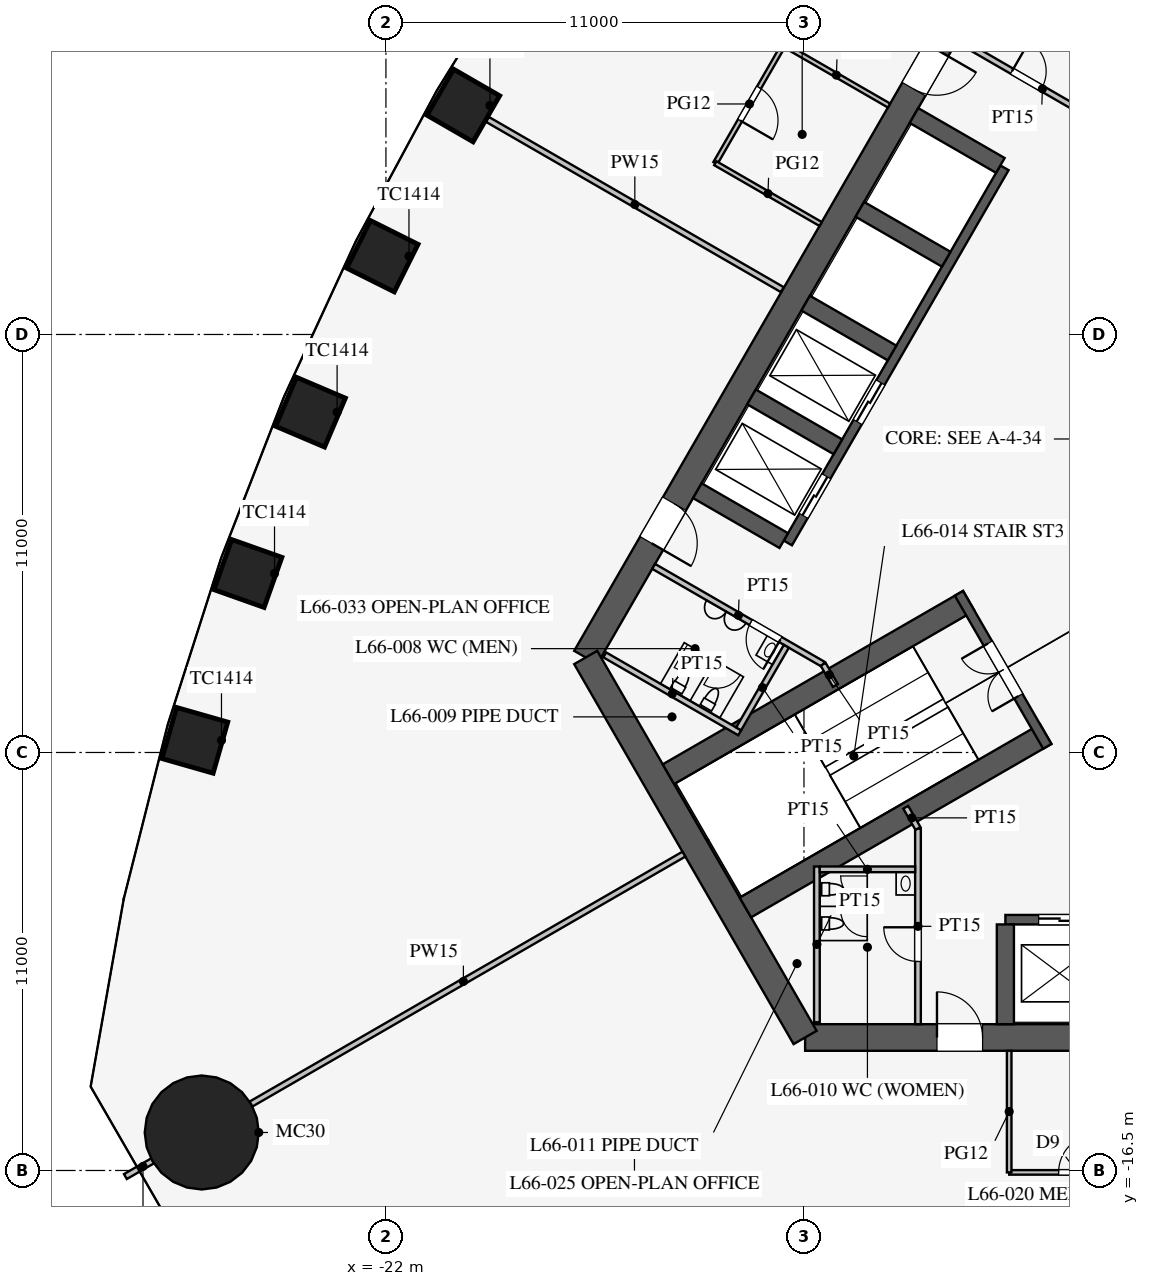
"""IFC4 building model, lengths in metres.
Left out: names, types, materials, properties, quantities, classifications, styles, units other than length and angle.
Written with IfcOpenShell. Run it as: python <this file> out.ifc"""

import sys

from ifc_helpers import new_model, si_unit, direction, frame, frame_2d, origin, origin_2d, place, context, subcontext, project, spatial, rectangle, circle, extrude, element, fill, save


model = new_model("IFC4")
c1 = context("Model", 3, precision=1e-05, world=origin(), true_north=direction((0.0, 1.0)))
c2 = subcontext(c1, "Body", "Model", "MODEL_VIEW")
j1 = project(units=[si_unit("LENGTHUNIT", "METRE"), si_unit("PLANEANGLEUNIT", "RADIAN")], contexts=[c1])
p1 = place(None, origin())
s1 = spatial("IfcSite", under=j1, at=p1, CompositionType="ELEMENT")
p2 = place(p1, origin())
s2 = spatial("IfcBuilding", under=s1, at=p2, CompositionType="ELEMENT")
p3 = place(p2, frame((0.0, 0.0, 288.9)))
s3 = spatial("IfcBuildingStorey", under=s2, at=p3, CompositionType="ELEMENT", Elevation=288.9)
for number, where, z_axis, x_axis in (
    (1, (-19.963, 11.526, 0.0), (0.0, 0.0, 1.0), (-0.5, -0.866, 0.0)),
    (2, (-22.094, 7.56, 0.0), (0.0, 0.0, 1.0), (-0.447, -0.895, 0.0)),
    (3, (-23.985, 3.455, 0.0), (0.0, 0.0, 1.0), (-0.391, -0.92, 0.0)),
    (4, (-25.632, -0.79, 0.0), (0.0, 0.0, 1.0), (-0.334, -0.942, 0.0)),
    (5, (-27.027, -5.18, 0.0), (0.0, 0.0, 1.0), (-0.275, -0.961, 0.0)),
):
    element("IfcColumn", number, at=place(p3, frame(where, z_axis=z_axis, x_axis=x_axis)), inside=s3, PredefinedType="COLUMN", context=c2, shape_type="SweptSolid", body=[
        extrude(rectangle(XDim=1.4, YDim=1.4, at=origin_2d()), origin(), (0.0, 0.0, 1.0), 4.2),
    ])
p4 = place(p3, frame((-26.847, -15.5, 0.0), z_axis=(0.0, 0.0, 1.0), x_axis=(1.0, 0.0, 0.0)))
e6 = element("IfcColumn", 6, at=p4, inside=s3, PredefinedType="COLUMN", context=c2, shape_type="SweptSolid", body=[
    extrude(circle(Radius=1.5, at=origin_2d()), origin(), (0.0, 0.0, 1.0), 4.2),
])
p5 = place(p3, frame((-10.97, -13.0, 0.0), z_axis=(0.0, 0.0, 1.0), x_axis=(1.0, 0.0, 0.0)))
e7 = element("IfcWall", 7, at=p5, inside=s3, PredefinedType="SHEAR", context=c2, shape_type="SweptSolid", body=[
    extrude(rectangle(XDim=21.939, YDim=0.7, at=frame_2d((10.97, 0.0))), origin(), (0.0, 0.0, 1.0), 4.2),
])
p6 = place(p5, frame((17.27, 0.0, 0.0)))
e8 = element("IfcOpeningElement", 8, at=p6, cuts=e7, PredefinedType="OPENING", context=c2, shape_type="SweptSolid", body=[
    extrude(rectangle(XDim=1.2, YDim=2.1, at=frame_2d((0.6, 1.05))), frame((0.0, 0.36, 0.0), z_axis=(0.0, -1.0, 0.0), x_axis=(1.0, 0.0, 0.0)), (0.0, 0.0, 1.0), 0.72),
])
p7 = place(p5, frame((3.47, 0.0, 0.0)))
e9 = element("IfcOpeningElement", 9, at=p7, cuts=e7, PredefinedType="OPENING", context=c2, shape_type="SweptSolid", body=[
    extrude(rectangle(XDim=1.2, YDim=2.1, at=frame_2d((0.6, 1.05))), frame((0.0, 0.36, 0.0), z_axis=(0.0, -1.0, 0.0), x_axis=(1.0, 0.0, 0.0)), (0.0, 0.0, 1.0), 0.72),
])
p8 = place(p3, frame((-5.773, 16.0, 0.0), z_axis=(0.0, 0.0, 1.0), x_axis=(-0.500002442456, -0.866023993627, 0.0)))
e10 = element("IfcWall", 10, at=p8, inside=s3, PredefinedType="SHEAR", context=c2, shape_type="SweptSolid", body=[
    extrude(rectangle(XDim=21.939, YDim=0.7, at=frame_2d((10.97, 0.0))), origin(), (0.0, 0.0, 1.0), 4.2),
])
p9 = place(p8, frame((17.27, 0.0, 0.0)))
e11 = element("IfcOpeningElement", 11, at=p9, cuts=e10, PredefinedType="OPENING", context=c2, shape_type="SweptSolid", body=[
    extrude(rectangle(XDim=1.2, YDim=2.1, at=frame_2d((0.6, 1.05))), frame((0.0, 0.36, 0.0), z_axis=(0.0, -1.0, 0.0), x_axis=(1.0, 0.0, 0.0)), (0.0, 0.0, 1.0), 0.72),
])
p10 = place(p8, frame((3.47, 0.0, 0.0)))
e12 = element("IfcOpeningElement", 12, at=p10, cuts=e10, PredefinedType="OPENING", context=c2, shape_type="SweptSolid", body=[
    extrude(rectangle(XDim=1.2, YDim=2.1, at=frame_2d((0.6, 1.05))), frame((0.0, 0.36, 0.0), z_axis=(0.0, -1.0, 0.0), x_axis=(1.0, 0.0, 0.0)), (0.0, 0.0, 1.0), 0.72),
])
p11 = place(p3, frame((-16.743, -3.0, 0.0), z_axis=(0.0, 0.0, 1.0), x_axis=(0.499995765644, -0.866027848477, 0.0)))
e13 = element("IfcWall", 13, at=p11, inside=s3, PredefinedType="SHEAR", context=c2, shape_type="SweptSolid", body=[
    extrude(rectangle(XDim=11.547, YDim=0.7, at=frame_2d((5.773, 0.0))), origin(), (0.0, 0.0, 1.0), 4.2),
])
p12 = place(p3, frame((-5.7, -9.9, 0.0), z_axis=(0.0, 0.0, 1.0), x_axis=(1.0, 0.0, 0.0)))
e14 = element("IfcWall", 14, at=p12, inside=s3, PredefinedType="SHEAR", context=c2, shape_type="SweptSolid", body=[
    extrude(rectangle(XDim=11.4, YDim=0.25, at=frame_2d((5.7, 0.0))), origin(), (0.0, 0.0, 1.0), 4.2),
])
p13 = place(p12, frame((0.875, 0.0, 0.0)))
e15 = element("IfcOpeningElement", 15, at=p13, cuts=e14, PredefinedType="OPENING", context=c2, shape_type="SweptSolid", body=[
    extrude(rectangle(XDim=1.1, YDim=2.2, at=frame_2d((0.55, 1.1))), frame((0.0, 0.135, 0.0), z_axis=(0.0, -1.0, 0.0), x_axis=(1.0, 0.0, 0.0)), (0.0, 0.0, 1.0), 0.27),
])
p14 = place(p12, frame((3.725, 0.0, 0.0)))
e16 = element("IfcOpeningElement", 16, at=p14, cuts=e14, PredefinedType="OPENING", context=c2, shape_type="SweptSolid", body=[
    extrude(rectangle(XDim=1.1, YDim=2.2, at=frame_2d((0.55, 1.1))), frame((0.0, 0.135, 0.0), z_axis=(0.0, -1.0, 0.0), x_axis=(1.0, 0.0, 0.0)), (0.0, 0.0, 1.0), 0.27),
])
p15 = place(p12, frame((6.575, 0.0, 0.0)))
e17 = element("IfcOpeningElement", 17, at=p15, cuts=e14, PredefinedType="OPENING", context=c2, shape_type="SweptSolid", body=[
    extrude(rectangle(XDim=1.1, YDim=2.2, at=frame_2d((0.55, 1.1))), frame((0.0, 0.135, 0.0), z_axis=(0.0, -1.0, 0.0), x_axis=(1.0, 0.0, 0.0)), (0.0, 0.0, 1.0), 0.27),
])
p16 = place(p12, frame((9.425, 0.0, 0.0)))
e18 = element("IfcOpeningElement", 18, at=p16, cuts=e14, PredefinedType="OPENING", context=c2, shape_type="SweptSolid", body=[
    extrude(rectangle(XDim=1.1, YDim=2.2, at=frame_2d((0.55, 1.1))), frame((0.0, 0.135, 0.0), z_axis=(0.0, -1.0, 0.0), x_axis=(1.0, 0.0, 0.0)), (0.0, 0.0, 1.0), 0.27),
])
p17 = place(p3, frame((-5.7, -10.025, 0.0), z_axis=(0.0, 0.0, 1.0), x_axis=(0.0, -1.0, 0.0)))
e19 = element("IfcWall", 19, at=p17, inside=s3, PredefinedType="SHEAR", context=c2, shape_type="SweptSolid", body=[
    extrude(rectangle(XDim=2.625, YDim=0.45, at=frame_2d((1.312, 0.0))), origin(), (0.0, 0.0, 1.0), 4.2),
])
p18 = place(p3, frame((-5.724, 9.886, 0.0), z_axis=(0.0, 0.0, 1.0), x_axis=(-0.500001763848, -0.866024385424, 0.0)))
e20 = element("IfcWall", 20, at=p18, inside=s3, PredefinedType="SHEAR", context=c2, shape_type="SweptSolid", body=[
    extrude(rectangle(XDim=11.4, YDim=0.25, at=frame_2d((5.7, 0.0))), origin(), (0.0, 0.0, 1.0), 4.2),
])
p19 = place(p18, frame((6.525, 0.0, 0.0)))
e21 = element("IfcOpeningElement", 21, at=p19, cuts=e20, PredefinedType="OPENING", context=c2, shape_type="SweptSolid", body=[
    extrude(rectangle(XDim=1.2, YDim=2.2, at=frame_2d((0.6, 1.1))), frame((0.0, 0.135, 0.0), z_axis=(0.0, -1.0, 0.0), x_axis=(1.0, 0.0, 0.0)), (0.0, 0.0, 1.0), 0.27),
])
p20 = place(p18, frame((9.375, 0.0, 0.0)))
e22 = element("IfcOpeningElement", 22, at=p20, cuts=e20, PredefinedType="OPENING", context=c2, shape_type="SweptSolid", body=[
    extrude(rectangle(XDim=1.2, YDim=2.2, at=frame_2d((0.6, 1.1))), frame((0.0, 0.135, 0.0), z_axis=(0.0, -1.0, 0.0), x_axis=(1.0, 0.0, 0.0)), (0.0, 0.0, 1.0), 0.27),
])
for number, where, z_axis, x_axis in (
    (23, (-5.832, 9.949, 0.0), (0.0, 0.0, 1.0), (-0.866, 0.5, 0.0)),
    (24, (-7.257, 7.481, 0.0), (0.0, 0.0, 1.0), (-0.866, 0.5, 0.0)),
    (25, (-8.682, 5.012, 0.0), (0.0, 0.0, 1.0), (-0.866, 0.5, 0.0)),
    (26, (-10.107, 2.544, 0.0), (0.0, 0.0, 1.0), (-0.866, 0.5, 0.0)),
    (27, (-11.532, 0.076, 0.0), (0.0, 0.0, 1.0), (-0.866, 0.5, 0.0)),
):
    element("IfcWall", number, at=place(p3, frame(where, z_axis=z_axis, x_axis=x_axis)), inside=s3, PredefinedType="SHEAR", context=c2, shape_type="SweptSolid", body=[
        extrude(rectangle(XDim=2.625, YDim=0.45, at=frame_2d((1.312, 0.0))), origin(), (0.0, 0.0, 1.0), 4.2),
    ])
for number, where, z_axis, x_axis in (
    (28, (-6.663, -1.509, 0.0), (0.0, 0.0, 1.0), (-0.866, -0.5, 0.0)),
    (29, (-4.638, -5.016, 0.0), (0.0, 0.0, 1.0), (-0.866, -0.5, 0.0)),
):
    element("IfcWall", number, at=place(p3, frame(where, z_axis=z_axis, x_axis=x_axis)), inside=s3, PredefinedType="SHEAR", context=c2, shape_type="SweptSolid", body=[
        extrude(rectangle(XDim=9.125, YDim=0.6, at=frame_2d((4.562, 0.0))), origin(), (0.0, 0.0, 1.0), 4.2),
    ])
p21 = place(p3, frame((-6.922, -1.312, 0.0), z_axis=(0.0, 0.0, 1.0), x_axis=(0.499984536904, -0.866034331223, 0.0)))
e30 = element("IfcWall", 30, at=p21, inside=s3, PredefinedType="SHEAR", context=c2, shape_type="SweptSolid", body=[
    extrude(rectangle(XDim=4.65, YDim=0.25, at=frame_2d((2.325, 0.0))), origin(), (0.0, 0.0, 1.0), 4.2),
])
p22 = place(p21, frame((1.525, 0.0, 0.0)))
e31 = element("IfcOpeningElement", 31, at=p22, cuts=e30, PredefinedType="OPENING", context=c2, shape_type="SweptSolid", body=[
    extrude(rectangle(XDim=1.6, YDim=2.1, at=frame_2d((0.8, 1.05))), frame((0.0, 0.135, 0.0), z_axis=(0.0, -1.0, 0.0), x_axis=(1.0, 0.0, 0.0)), (0.0, 0.0, 1.0), 0.27),
])
p23 = place(p3, frame((-8.0, -7.5, 0.0), z_axis=(0.0, 0.0, 1.0), x_axis=(0.0, -1.0, 0.0)))
e32 = element("IfcWall", 32, at=p23, inside=s3, PredefinedType="PARTITIONING", context=c2, shape_type="SweptSolid", body=[
    extrude(rectangle(XDim=5.15, YDim=0.15, at=frame_2d((2.575, 0.0))), origin(), (0.0, 0.0, 1.0), 4.0),
])
p24 = place(p23, frame((2.6, 0.0, 0.0)))
e33 = element("IfcOpeningElement", 33, at=p24, cuts=e32, PredefinedType="OPENING", context=c2, shape_type="SweptSolid", body=[
    extrude(rectangle(XDim=0.9, YDim=2.1, at=frame_2d((0.45, 1.05))), frame((0.0, 0.085, 0.0), z_axis=(0.0, -1.0, 0.0), x_axis=(1.0, 0.0, 0.0)), (0.0, 0.0, 1.0), 0.17),
])
p25 = place(p3, frame((-10.495, -3.178, 0.0), z_axis=(0.0, 0.0, 1.0), x_axis=(-0.866037967349, 0.499978238636, 0.0)))
e34 = element("IfcWall", 34, at=p25, inside=s3, PredefinedType="PARTITIONING", context=c2, shape_type="SweptSolid", body=[
    extrude(rectangle(XDim=5.15, YDim=0.15, at=frame_2d((2.575, 0.0))), origin(), (0.0, 0.0, 1.0), 4.0),
])
p26 = place(p25, frame((1.3, 0.0, 0.0)))
e35 = element("IfcOpeningElement", 35, at=p26, cuts=e34, PredefinedType="OPENING", context=c2, shape_type="SweptSolid", body=[
    extrude(rectangle(XDim=0.9, YDim=2.1, at=frame_2d((0.45, 1.05))), frame((0.0, 0.085, 0.0), z_axis=(0.0, -1.0, 0.0), x_axis=(1.0, 0.0, 0.0)), (0.0, 0.0, 1.0), 0.17),
])
p27 = place(p3, frame((-2.495, 10.678, 0.0), z_axis=(0.0, 0.0, 1.0), x_axis=(-0.866037967349, 0.499978238636, 0.0)))
e36 = element("IfcWall", 36, at=p27, inside=s3, PredefinedType="PARTITIONING", context=c2, shape_type="SweptSolid", body=[
    extrude(rectangle(XDim=5.15, YDim=0.15, at=frame_2d((2.575, 0.0))), origin(), (0.0, 0.0, 1.0), 4.0),
])
p28 = place(p27, frame((2.6, 0.0, 0.0)))
e37 = element("IfcOpeningElement", 37, at=p28, cuts=e36, PredefinedType="OPENING", context=c2, shape_type="SweptSolid", body=[
    extrude(rectangle(XDim=0.9, YDim=2.1, at=frame_2d((0.45, 1.05))), frame((0.0, 0.085, 0.0), z_axis=(0.0, -1.0, 0.0), x_axis=(1.0, 0.0, 0.0)), (0.0, 0.0, 1.0), 0.17),
])
for number, where, z_axis, x_axis in (
    (38, (-10.495, -3.178, 0.0), (0.0, 0.0, 1.0), (0.5, -0.866, 0.0)),
    (39, (-8.0, -7.5, 0.0), (0.0, 0.0, 1.0), (-0.5, 0.866, 0.0)),
):
    element("IfcWall", number, at=place(p3, frame(where, z_axis=z_axis, x_axis=x_axis)), inside=s3, PredefinedType="PARTITIONING", context=c2, shape_type="SweptSolid", body=[
        extrude(rectangle(XDim=0.645, YDim=0.15, at=frame_2d((0.323, 0.0))), origin(), (0.0, 0.0, 1.0), 4.0),
    ])
p29 = place(p3, frame((-12.691, -4.982, 0.0), z_axis=(0.0, 0.0, 1.0), x_axis=(-0.8660249478, 0.500000789788, 0.0)))
e40 = element("IfcWall", 40, at=p29, inside=s3, PredefinedType="PARTITIONING", context=c2, shape_type="SweptSolid", body=[
    extrude(rectangle(XDim=4.1, YDim=0.15, at=frame_2d((2.05, 0.0))), origin(), (0.0, 0.0, 1.0), 4.0),
])
p30 = place(p3, frame((-11.464, -2.706, 0.0), z_axis=(0.0, 0.0, 1.0), x_axis=(-0.50001992892, -0.866013897511, 0.0)))
e41 = element("IfcWall", 41, at=p30, inside=s3, PredefinedType="PARTITIONING", context=c2, shape_type="SweptSolid", body=[
    extrude(rectangle(XDim=2.51, YDim=0.15, at=frame_2d((1.255, 0.0))), origin(), (0.0, 0.0, 1.0), 4.0),
])
p31 = place(p3, frame((-10.66, -8.5, 0.0), z_axis=(0.0, 0.0, 1.0), x_axis=(0.0, -1.0, 0.0)))
e42 = element("IfcWall", 42, at=p31, inside=s3, PredefinedType="PARTITIONING", context=c2, shape_type="SweptSolid", body=[
    extrude(rectangle(XDim=4.1, YDim=0.15, at=frame_2d((2.05, 0.0))), origin(), (0.0, 0.0, 1.0), 4.0),
])
p32 = place(p3, frame((-8.075, -8.575, 0.0), z_axis=(0.0, 0.0, 1.0), x_axis=(-1.0, 0.0, 0.0)))
e43 = element("IfcWall", 43, at=p32, inside=s3, PredefinedType="PARTITIONING", context=c2, shape_type="SweptSolid", body=[
    extrude(rectangle(XDim=2.51, YDim=0.15, at=frame_2d((1.255, 0.0))), origin(), (0.0, 0.0, 1.0), 4.0),
])
p33 = place(p3, frame((-14.159, -8.175, 0.0), z_axis=(0.0, 0.0, 1.0), x_axis=(-0.866026905467, -0.499997399001, 0.0)))
e44 = element("IfcWall", 44, at=p33, inside=s3, PredefinedType="PARTITIONING", context=c2, shape_type="SweptSolid", body=[
    extrude(rectangle(XDim=13.4, YDim=0.15, at=frame_2d((6.7, 0.0))), origin(), (0.0, 0.0, 1.0), 2.5),
])
p34 = place(p3, frame((-27.929, -16.125, 0.0), z_axis=(0.0, 0.0, 1.0), x_axis=(-0.866086810508, -0.499893625349, 0.0)))
e45 = element("IfcWall", 45, at=p34, inside=s3, PredefinedType="PARTITIONING", context=c2, shape_type="SweptSolid", body=[
    extrude(rectangle(XDim=1.07, YDim=0.15, at=frame_2d((0.535, 0.0))), origin(), (0.0, 0.0, 1.0), 2.5),
])
p35 = place(p3, frame((-5.6, -16.55, 0.0), z_axis=(0.0, 0.0, 1.0), x_axis=(1.0, 0.0, 0.0)))
e46 = element("IfcWall", 46, at=p35, inside=s3, PredefinedType="PARTITIONING", context=c2, shape_type="SweptSolid", body=[
    extrude(rectangle(XDim=3.6, YDim=0.12, at=frame_2d((1.8, 0.0))), origin(), (0.0, 0.0, 1.0), 2.9),
])
p36 = place(p35, frame((1.3, 0.0, 0.15)))
e47 = element("IfcOpeningElement", 47, at=p36, cuts=e46, PredefinedType="OPENING", context=c2, shape_type="SweptSolid", body=[
    extrude(rectangle(XDim=1.0, YDim=2.1, at=frame_2d((0.5, 1.05))), frame((0.0, 0.07, 0.0), z_axis=(0.0, -1.0, 0.0), x_axis=(1.0, 0.0, 0.0)), (0.0, 0.0, 1.0), 0.14),
])
p37 = place(p3, frame((-5.6, -13.35, 0.0), z_axis=(0.0, 0.0, 1.0), x_axis=(0.0, -1.0, 0.0)))
e48 = element("IfcWall", 48, at=p37, inside=s3, PredefinedType="PARTITIONING", context=c2, shape_type="SweptSolid", body=[
    extrude(rectangle(XDim=3.2, YDim=0.12, at=frame_2d((1.6, 0.0))), origin(), (0.0, 0.0, 1.0), 2.9),
])
p38 = place(p3, frame((-11.57, 6.68, 0.0), z_axis=(0.0, 0.0, 1.0), x_axis=(-0.866018180823, 0.500012510328, 0.0)))
e49 = element("IfcWall", 49, at=p38, inside=s3, PredefinedType="PARTITIONING", context=c2, shape_type="SweptSolid", body=[
    extrude(rectangle(XDim=8.962, YDim=0.15, at=frame_2d((4.481, 0.0))), origin(), (0.0, 0.0, 1.0), 3.3),
])
p39 = place(p3, frame((-11.533, 13.125, 0.0), z_axis=(0.0, 0.0, 1.0), x_axis=(-0.500012057535, -0.866018442252, 0.0)))
e50 = element("IfcWall", 50, at=p39, inside=s3, PredefinedType="PARTITIONING", context=c2, shape_type="SweptSolid", body=[
    extrude(rectangle(XDim=3.6, YDim=0.12, at=frame_2d((1.8, 0.0))), origin(), (0.0, 0.0, 1.0), 2.9),
])
p40 = place(p39, frame((1.3, 0.0, 0.15)))
e51 = element("IfcOpeningElement", 51, at=p40, cuts=e50, PredefinedType="OPENING", context=c2, shape_type="SweptSolid", body=[
    extrude(rectangle(XDim=1.0, YDim=2.1, at=frame_2d((0.5, 1.05))), frame((0.0, 0.07, 0.0), z_axis=(0.0, -1.0, 0.0), x_axis=(1.0, 0.0, 0.0)), (0.0, 0.0, 1.0), 0.14),
])
for number, where, z_axis, x_axis in (
    (52, (-10.562, 8.407, 0.0), (0.0, 0.0, 1.0), (-0.866, 0.5, 0.0)),
    (53, (-8.761, 11.525, 0.0), (0.0, 0.0, 1.0), (-0.866, 0.5, 0.0)),
):
    element("IfcWall", number, at=place(p3, frame(where, z_axis=z_axis, x_axis=x_axis)), inside=s3, PredefinedType="PARTITIONING", context=c2, shape_type="SweptSolid", body=[
        extrude(rectangle(XDim=3.2, YDim=0.12, at=frame_2d((1.6, 0.0))), origin(), (0.0, 0.0, 1.0), 2.9),
    ])
p41 = place(p24, frame((0.9, 0.0, 0.0), z_axis=(0.0, 0.0, 1.0), x_axis=(-1.0, 0.0, 0.0)))
e54 = element("IfcDoor", 54, at=p41, inside=s3, OperationType="SINGLE_SWING_RIGHT", PredefinedType="DOOR", context=c2, shape_type="SweptSolid", body=[
    extrude(rectangle(XDim=0.9, YDim=2.1, at=frame_2d((0.45, 1.05))), frame((0.0, 0.025, 0.0), z_axis=(0.0, -1.0, 0.0), x_axis=(1.0, 0.0, 0.0)), (0.0, 0.0, 1.0), 0.05),
])
fill(e33, e54)
p42 = place(p26, origin())
e55 = element("IfcDoor", 55, at=p42, inside=s3, OperationType="SINGLE_SWING_LEFT", PredefinedType="DOOR", context=c2, shape_type="SweptSolid", body=[
    extrude(rectangle(XDim=0.9, YDim=2.1, at=frame_2d((0.45, 1.05))), frame((0.0, 0.025, 0.0), z_axis=(0.0, -1.0, 0.0), x_axis=(1.0, 0.0, 0.0)), (0.0, 0.0, 1.0), 0.05),
])
fill(e35, e55)
p43 = place(p28, frame((0.9, 0.0, 0.0), z_axis=(0.0, 0.0, 1.0), x_axis=(-1.0, 0.0, 0.0)))
e56 = element("IfcDoor", 56, at=p43, inside=s3, OperationType="SINGLE_SWING_LEFT", PredefinedType="DOOR", context=c2, shape_type="SweptSolid", body=[
    extrude(rectangle(XDim=0.9, YDim=2.1, at=frame_2d((0.45, 1.05))), frame((0.0, 0.025, 0.0), z_axis=(0.0, -1.0, 0.0), x_axis=(1.0, 0.0, 0.0)), (0.0, 0.0, 1.0), 0.05),
])
fill(e37, e56)
p44 = place(p22, frame((1.6, 0.0, 0.0), z_axis=(0.0, 0.0, 1.0), x_axis=(-1.0, 0.0, 0.0)))
e57 = element("IfcDoor", 57, at=p44, inside=s3, OperationType="DOUBLE_DOOR_SINGLE_SWING", PredefinedType="DOOR", context=c2, shape_type="SweptSolid", body=[
    extrude(rectangle(XDim=1.6, YDim=2.1, at=frame_2d((0.8, 1.05))), frame((0.0, 0.025, 0.0), z_axis=(0.0, -1.0, 0.0), x_axis=(1.0, 0.0, 0.0)), (0.0, 0.0, 1.0), 0.05),
])
fill(e31, e57)
p45 = place(p7, origin())
e58 = element("IfcDoor", 58, at=p45, inside=s3, OperationType="SINGLE_SWING_LEFT", PredefinedType="DOOR", context=c2, shape_type="SweptSolid", body=[
    extrude(rectangle(XDim=1.2, YDim=2.1, at=frame_2d((0.6, 1.05))), frame((0.0, 0.025, 0.0), z_axis=(0.0, -1.0, 0.0), x_axis=(1.0, 0.0, 0.0)), (0.0, 0.0, 1.0), 0.05),
])
fill(e9, e58)
p46 = place(p9, origin())
e59 = element("IfcDoor", 59, at=p46, inside=s3, OperationType="SINGLE_SWING_RIGHT", PredefinedType="DOOR", context=c2, shape_type="SweptSolid", body=[
    extrude(rectangle(XDim=1.2, YDim=2.1, at=frame_2d((0.6, 1.05))), frame((0.0, 0.025, 0.0), z_axis=(0.0, -1.0, 0.0), x_axis=(1.0, 0.0, 0.0)), (0.0, 0.0, 1.0), 0.05),
])
fill(e11, e59)
p47 = place(p10, origin())
e60 = element("IfcDoor", 60, at=p47, inside=s3, OperationType="SINGLE_SWING_LEFT", PredefinedType="DOOR", context=c2, shape_type="SweptSolid", body=[
    extrude(rectangle(XDim=1.2, YDim=2.1, at=frame_2d((0.6, 1.05))), frame((0.0, 0.025, 0.0), z_axis=(0.0, -1.0, 0.0), x_axis=(1.0, 0.0, 0.0)), (0.0, 0.0, 1.0), 0.05),
])
fill(e12, e60)
p48 = place(p36, origin())
e61 = element("IfcDoor", 61, at=p48, inside=s3, OperationType="SINGLE_SWING_RIGHT", PredefinedType="DOOR", context=c2, shape_type="SweptSolid", body=[
    extrude(rectangle(XDim=1.0, YDim=2.1, at=frame_2d((0.5, 1.05))), frame((0.0, 0.025, 0.0), z_axis=(0.0, -1.0, 0.0), x_axis=(1.0, 0.0, 0.0)), (0.0, 0.0, 1.0), 0.05),
])
fill(e47, e61)
p49 = place(p40, origin())
e62 = element("IfcDoor", 62, at=p49, inside=s3, OperationType="SINGLE_SWING_RIGHT", PredefinedType="DOOR", context=c2, shape_type="SweptSolid", body=[
    extrude(rectangle(XDim=1.0, YDim=2.1, at=frame_2d((0.5, 1.05))), frame((0.0, 0.025, 0.0), z_axis=(0.0, -1.0, 0.0), x_axis=(1.0, 0.0, 0.0)), (0.0, 0.0, 1.0), 0.05),
])
fill(e51, e62)
p50 = place(p13, origin())
e63 = element("IfcDoor", 63, at=p50, inside=s3, OperationType="DOUBLE_DOOR_SLIDING", PredefinedType="DOOR", context=c2, shape_type="SweptSolid", body=[
    extrude(rectangle(XDim=1.1, YDim=2.2, at=frame_2d((0.55, 1.1))), frame((0.0, 0.025, 0.0), z_axis=(0.0, -1.0, 0.0), x_axis=(1.0, 0.0, 0.0)), (0.0, 0.0, 1.0), 0.05),
])
fill(e15, e63)
p51 = place(p19, origin())
e64 = element("IfcDoor", 64, at=p51, inside=s3, OperationType="DOUBLE_DOOR_SLIDING", PredefinedType="DOOR", context=c2, shape_type="SweptSolid", body=[
    extrude(rectangle(XDim=1.2, YDim=2.2, at=frame_2d((0.6, 1.1))), frame((0.0, 0.025, 0.0), z_axis=(0.0, -1.0, 0.0), x_axis=(1.0, 0.0, 0.0)), (0.0, 0.0, 1.0), 0.05),
])
fill(e21, e64)
p52 = place(p20, origin())
e65 = element("IfcDoor", 65, at=p52, inside=s3, OperationType="DOUBLE_DOOR_SLIDING", PredefinedType="DOOR", context=c2, shape_type="SweptSolid", body=[
    extrude(rectangle(XDim=1.2, YDim=2.2, at=frame_2d((0.6, 1.1))), frame((0.0, 0.025, 0.0), z_axis=(0.0, -1.0, 0.0), x_axis=(1.0, 0.0, 0.0)), (0.0, 0.0, 1.0), 0.05),
])
fill(e22, e65)
save(model, sys.argv[1])
